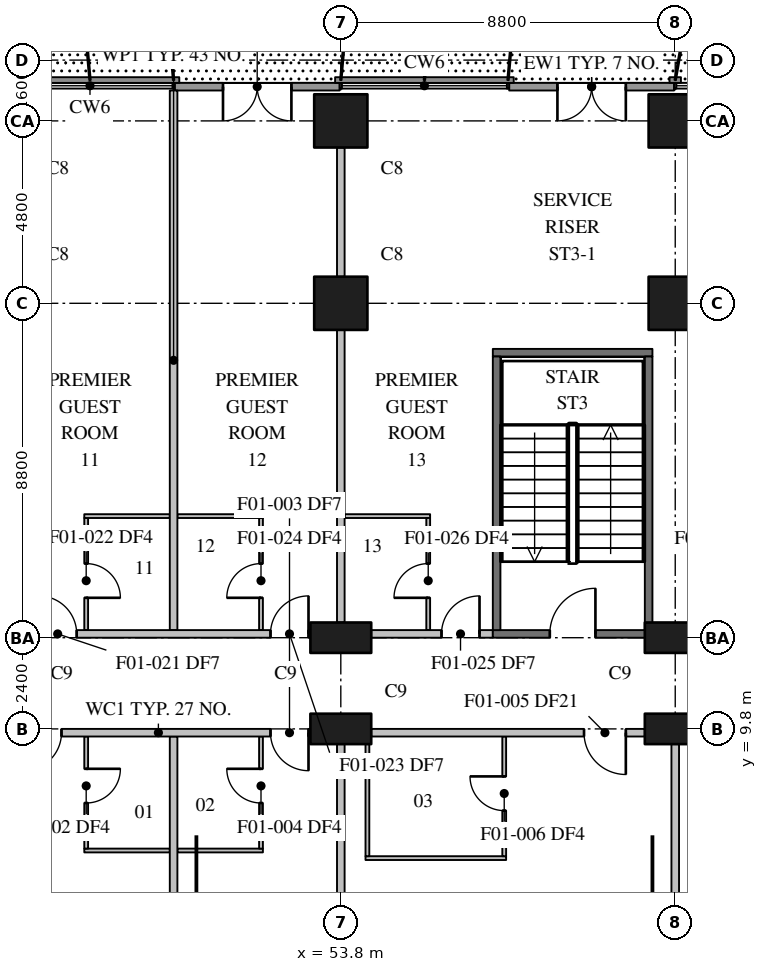
"""IFC4 building model, lengths in metres.
Left out: names, types, materials, properties, quantities, classifications, styles, units other than length and angle.
Written with IfcOpenShell. Run it as: python <this file> out.ifc"""

import sys

from ifc_helpers import new_model, si_unit, direction, frame, frame_2d, origin, origin_2d, place, context, subcontext, project, spatial, rectangle, extrude, element, fill, save


model = new_model("IFC4")
c1 = context("Model", 3, precision=1e-05, world=origin(), true_north=direction((0.0, 1.0)))
c2 = subcontext(c1, "Body", "Model", "MODEL_VIEW")
j1 = project(units=[si_unit("LENGTHUNIT", "METRE"), si_unit("PLANEANGLEUNIT", "RADIAN")], contexts=[c1])
p1 = place(None, origin())
s1 = spatial("IfcSite", under=j1, at=p1, CompositionType="ELEMENT")
p2 = place(p1, origin())
s2 = spatial("IfcBuilding", under=s1, at=p2, CompositionType="ELEMENT")
p3 = place(p2, frame((0.0, 0.0, 34.0)))
s3 = spatial("IfcBuildingStorey", under=s2, at=p3, CompositionType="ELEMENT", Elevation=34.0)
for number, where, z_axis, x_axis in (
    (1, (53.8, 9.8, 0.0), (0.0, 0.0, 1.0), (1.0, 0.0, 0.0)),
    (2, (53.8, 12.2, 0.0), (0.0, 0.0, 1.0), (1.0, 0.0, 0.0)),
):
    element("IfcColumn", number, at=place(p3, frame(where, z_axis=z_axis, x_axis=x_axis)), inside=s3, PredefinedType="COLUMN", context=c2, shape_type="SweptSolid", body=[
        extrude(rectangle(XDim=1.6, YDim=0.8, at=origin_2d()), origin(), (0.0, 0.0, 1.0), 3.7),
    ])
for number, where, z_axis, x_axis in (
    (3, (53.8, 21.0, 0.0), (0.0, 0.0, 1.0), (1.0, 0.0, 0.0)),
    (4, (53.8, 25.8, 0.0), (0.0, 0.0, 1.0), (1.0, 0.0, 0.0)),
):
    element("IfcColumn", number, at=place(p3, frame(where, z_axis=z_axis, x_axis=x_axis)), inside=s3, PredefinedType="COLUMN", context=c2, shape_type="SweptSolid", body=[
        extrude(rectangle(XDim=1.4, YDim=1.4, at=origin_2d()), origin(), (0.0, 0.0, 1.0), 3.7),
    ])
for number, where, z_axis, x_axis in (
    (5, (62.6, 9.8, 0.0), (0.0, 0.0, 1.0), (1.0, 0.0, 0.0)),
    (6, (62.6, 12.2, 0.0), (0.0, 0.0, 1.0), (1.0, 0.0, 0.0)),
):
    element("IfcColumn", number, at=place(p3, frame(where, z_axis=z_axis, x_axis=x_axis)), inside=s3, PredefinedType="COLUMN", context=c2, shape_type="SweptSolid", body=[
        extrude(rectangle(XDim=1.6, YDim=0.8, at=origin_2d()), origin(), (0.0, 0.0, 1.0), 3.7),
    ])
for number, where, z_axis, x_axis in (
    (7, (62.6, 21.0, 0.0), (0.0, 0.0, 1.0), (1.0, 0.0, 0.0)),
    (8, (62.6, 25.8, 0.0), (0.0, 0.0, 1.0), (1.0, 0.0, 0.0)),
):
    element("IfcColumn", number, at=place(p3, frame(where, z_axis=z_axis, x_axis=x_axis)), inside=s3, PredefinedType="COLUMN", context=c2, shape_type="SweptSolid", body=[
        extrude(rectangle(XDim=1.4, YDim=1.4, at=origin_2d()), origin(), (0.0, 0.0, 1.0), 3.7),
    ])
p4 = place(p3, frame((62.57, 26.7, 0.0), z_axis=(0.0, 0.0, 1.0), x_axis=(-1.0, 0.0, 0.0)))
e9 = element("IfcWall", 9, at=p4, inside=s3, PredefinedType="STANDARD", context=c2, shape_type="SweptSolid", body=[
    extrude(rectangle(XDim=4.34, YDim=0.2, at=frame_2d((2.17, 0.0))), origin(), (0.0, 0.0, 1.0), 3.4),
])
p5 = place(p4, frame((1.27, 0.0, 0.0)))
e10 = element("IfcOpeningElement", 10, at=p5, cuts=e9, PredefinedType="OPENING", context=c2, shape_type="SweptSolid", body=[
    extrude(rectangle(XDim=1.8, YDim=2.4, at=frame_2d((0.9, 1.2))), frame((0.0, 0.11, 0.0), z_axis=(0.0, -1.0, 0.0), x_axis=(1.0, 0.0, 0.0)), (0.0, 0.0, 1.0), 0.22),
])
p6 = place(p3, frame((53.77, 26.7, 0.0), z_axis=(0.0, 0.0, 1.0), x_axis=(-1.0, 0.0, 0.0)))
e11 = element("IfcWall", 11, at=p6, inside=s3, PredefinedType="STANDARD", context=c2, shape_type="SweptSolid", body=[
    extrude(rectangle(XDim=4.34, YDim=0.2, at=frame_2d((2.17, 0.0))), origin(), (0.0, 0.0, 1.0), 3.4),
])
p7 = place(p6, frame((1.27, 0.0, 0.0)))
e12 = element("IfcOpeningElement", 12, at=p7, cuts=e11, PredefinedType="OPENING", context=c2, shape_type="SweptSolid", body=[
    extrude(rectangle(XDim=1.8, YDim=2.4, at=frame_2d((0.9, 1.2))), frame((0.0, 0.11, 0.0), z_axis=(0.0, -1.0, 0.0), x_axis=(1.0, 0.0, 0.0)), (0.0, 0.0, 1.0), 0.22),
])
p8 = place(p3, frame((57.8, 12.3, 0.0), z_axis=(0.0, 0.0, 1.0), x_axis=(1.0, 0.0, 0.0)))
e13 = element("IfcWall", 13, at=p8, inside=s3, PredefinedType="SHEAR", context=c2, shape_type="SweptSolid", body=[
    extrude(rectangle(XDim=4.2, YDim=0.2, at=frame_2d((2.1, 0.0))), origin(), (0.0, 0.0, 1.0), 3.4),
])
p9 = place(p8, frame((1.5, 0.0, 0.0)))
e14 = element("IfcOpeningElement", 14, at=p9, cuts=e13, PredefinedType="OPENING", context=c2, shape_type="SweptSolid", body=[
    extrude(rectangle(XDim=1.2, YDim=2.1, at=frame_2d((0.6, 1.05))), frame((0.0, 0.11, 0.0), z_axis=(0.0, -1.0, 0.0), x_axis=(1.0, 0.0, 0.0)), (0.0, 0.0, 1.0), 0.22),
])
p10 = place(p3, frame((57.8, 19.7, 0.0), z_axis=(0.0, 0.0, 1.0), x_axis=(1.0, 0.0, 0.0)))
e15 = element("IfcWall", 15, at=p10, inside=s3, PredefinedType="SHEAR", context=c2, shape_type="SweptSolid", body=[
    extrude(rectangle(XDim=4.2, YDim=0.2, at=frame_2d((2.1, 0.0))), origin(), (0.0, 0.0, 1.0), 3.4),
])
for number, where, z_axis, x_axis in (
    (16, (57.9, 12.4, 0.0), (0.0, 0.0, 1.0), (0.0, 1.0, 0.0)),
    (17, (61.9, 12.4, 0.0), (0.0, 0.0, 1.0), (0.0, 1.0, 0.0)),
):
    element("IfcWall", number, at=place(p3, frame(where, z_axis=z_axis, x_axis=x_axis)), inside=s3, PredefinedType="SHEAR", context=c2, shape_type="SweptSolid", body=[
        extrude(rectangle(XDim=7.2, YDim=0.2, at=frame_2d((3.6, 0.0))), origin(), (0.0, 0.0, 1.0), 3.4),
    ])
p11 = place(p3, frame((53.0, 9.7, 0.0), z_axis=(0.0, 0.0, 1.0), x_axis=(-1.0, 0.0, 0.0)))
e18 = element("IfcWall", 18, at=p11, inside=s3, PredefinedType="PARTITIONING", context=c2, shape_type="SweptSolid", body=[
    extrude(rectangle(XDim=8.0, YDim=0.2, at=frame_2d((4.0, 0.0))), origin(), (0.0, 0.0, 1.0), 3.4),
])
p12 = place(p11, frame((6.55, 0.0, 0.0)))
e19 = element("IfcOpeningElement", 19, at=p12, cuts=e18, PredefinedType="OPENING", context=c2, shape_type="SweptSolid", body=[
    extrude(rectangle(XDim=1.0, YDim=2.1, at=frame_2d((0.5, 1.05))), frame((0.0, 0.11, 0.0), z_axis=(0.0, -1.0, 0.0), x_axis=(1.0, 0.0, 0.0)), (0.0, 0.0, 1.0), 0.22),
])
p13 = place(p11, frame((0.05, 0.0, 0.0)))
e20 = element("IfcOpeningElement", 20, at=p13, cuts=e18, PredefinedType="OPENING", context=c2, shape_type="SweptSolid", body=[
    extrude(rectangle(XDim=1.0, YDim=2.1, at=frame_2d((0.5, 1.05))), frame((0.0, 0.11, 0.0), z_axis=(0.0, -1.0, 0.0), x_axis=(1.0, 0.0, 0.0)), (0.0, 0.0, 1.0), 0.22),
])
p14 = place(p3, frame((61.8, 9.7, 0.0), z_axis=(0.0, 0.0, 1.0), x_axis=(-1.0, 0.0, 0.0)))
e21 = element("IfcWall", 21, at=p14, inside=s3, PredefinedType="PARTITIONING", context=c2, shape_type="SweptSolid", body=[
    extrude(rectangle(XDim=7.2, YDim=0.2, at=frame_2d((3.6, 0.0))), origin(), (0.0, 0.0, 1.0), 3.4),
])
p15 = place(p14, frame((0.5, 0.0, 0.0)))
e22 = element("IfcOpeningElement", 22, at=p15, cuts=e21, PredefinedType="OPENING", context=c2, shape_type="SweptSolid", body=[
    extrude(rectangle(XDim=1.1, YDim=2.1, at=frame_2d((0.55, 1.05))), frame((0.0, 0.11, 0.0), z_axis=(0.0, -1.0, 0.0), x_axis=(1.0, 0.0, 0.0)), (0.0, 0.0, 1.0), 0.22),
])
p16 = place(p3, frame((49.4, 0.31, 0.0), z_axis=(0.0, 0.0, 1.0), x_axis=(0.0, 1.0, 0.0)))
e23 = element("IfcWall", 23, at=p16, inside=s3, PredefinedType="PARTITIONING", context=c2, shape_type="SweptSolid", body=[
    extrude(rectangle(XDim=9.29, YDim=0.2, at=frame_2d((4.645, 0.0))), origin(), (0.0, 0.0, 1.0), 3.4),
])
p17 = place(p3, frame((49.4, 12.4, 0.0), z_axis=(0.0, 0.0, 1.0), x_axis=(0.0, 1.0, 0.0)))
e24 = element("IfcWall", 24, at=p17, inside=s3, PredefinedType="PARTITIONING", context=c2, shape_type="SweptSolid", body=[
    extrude(rectangle(XDim=14.2, YDim=0.2, at=frame_2d((7.1, 0.0))), origin(), (0.0, 0.0, 1.0), 3.4),
])
for number, where, z_axis, x_axis in (
    (25, (53.8, 1.7, 0.0), (0.0, 0.0, 1.0), (0.0, 1.0, 0.0)),
    (26, (53.8, 12.6, 0.0), (0.0, 0.0, 1.0), (0.0, 1.0, 0.0)),
):
    element("IfcWall", number, at=place(p3, frame(where, z_axis=z_axis, x_axis=x_axis)), inside=s3, PredefinedType="PARTITIONING", context=c2, shape_type="SweptSolid", body=[
        extrude(rectangle(XDim=7.7, YDim=0.2, at=frame_2d((3.85, 0.0))), origin(), (0.0, 0.0, 1.0), 3.4),
    ])
p18 = place(p3, frame((53.8, 21.7, 0.0), z_axis=(0.0, 0.0, 1.0), x_axis=(0.0, 1.0, 0.0)))
e27 = element("IfcWall", 27, at=p18, inside=s3, PredefinedType="PARTITIONING", context=c2, shape_type="SweptSolid", body=[
    extrude(rectangle(XDim=3.4, YDim=0.2, at=frame_2d((1.7, 0.0))), origin(), (0.0, 0.0, 1.0), 3.4),
])
p19 = place(p3, frame((62.6, 1.7, 0.0), z_axis=(0.0, 0.0, 1.0), x_axis=(0.0, 1.0, 0.0)))
e28 = element("IfcWall", 28, at=p19, inside=s3, PredefinedType="PARTITIONING", context=c2, shape_type="SweptSolid", body=[
    extrude(rectangle(XDim=7.7, YDim=0.2, at=frame_2d((3.85, 0.0))), origin(), (0.0, 0.0, 1.0), 3.4),
])
p20 = place(p3, frame((45.8, 12.3, 0.0), z_axis=(0.0, 0.0, 1.0), x_axis=(1.0, 0.0, 0.0)))
e29 = element("IfcWall", 29, at=p20, inside=s3, PredefinedType="PARTITIONING", context=c2, shape_type="SweptSolid", body=[
    extrude(rectangle(XDim=7.2, YDim=0.2, at=frame_2d((3.6, 0.0))), origin(), (0.0, 0.0, 1.0), 3.4),
])
p21 = place(p20, frame((0.05, 0.0, 0.0)))
e30 = element("IfcOpeningElement", 30, at=p21, cuts=e29, PredefinedType="OPENING", context=c2, shape_type="SweptSolid", body=[
    extrude(rectangle(XDim=1.0, YDim=2.1, at=frame_2d((0.5, 1.05))), frame((0.0, 0.11, 0.0), z_axis=(0.0, -1.0, 0.0), x_axis=(1.0, 0.0, 0.0)), (0.0, 0.0, 1.0), 0.22),
])
p22 = place(p20, frame((6.15, 0.0, 0.0)))
e31 = element("IfcOpeningElement", 31, at=p22, cuts=e29, PredefinedType="OPENING", context=c2, shape_type="SweptSolid", body=[
    extrude(rectangle(XDim=1.0, YDim=2.1, at=frame_2d((0.5, 1.05))), frame((0.0, 0.11, 0.0), z_axis=(0.0, -1.0, 0.0), x_axis=(1.0, 0.0, 0.0)), (0.0, 0.0, 1.0), 0.22),
])
p23 = place(p3, frame((54.6, 12.3, 0.0), z_axis=(0.0, 0.0, 1.0), x_axis=(1.0, 0.0, 0.0)))
e32 = element("IfcWall", 32, at=p23, inside=s3, PredefinedType="PARTITIONING", context=c2, shape_type="SweptSolid", body=[
    extrude(rectangle(XDim=3.2, YDim=0.2, at=frame_2d((1.6, 0.0))), origin(), (0.0, 0.0, 1.0), 3.4),
])
p24 = place(p23, frame((1.85, 0.0, 0.0)))
e33 = element("IfcOpeningElement", 33, at=p24, cuts=e32, PredefinedType="OPENING", context=c2, shape_type="SweptSolid", body=[
    extrude(rectangle(XDim=1.0, YDim=2.1, at=frame_2d((0.5, 1.05))), frame((0.0, 0.11, 0.0), z_axis=(0.0, -1.0, 0.0), x_axis=(1.0, 0.0, 0.0)), (0.0, 0.0, 1.0), 0.22),
])
for number, where, z_axis, x_axis in (
    (34, (47.05, 6.6, 0.0), (0.0, 0.0, 1.0), (1.0, 0.0, 0.0)),
    (35, (49.5, 6.6, 0.0), (0.0, 0.0, 1.0), (1.0, 0.0, 0.0)),
):
    element("IfcWall", number, at=place(p3, frame(where, z_axis=z_axis, x_axis=x_axis)), inside=s3, PredefinedType="PARTITIONING", context=c2, shape_type="SweptSolid", body=[
        extrude(rectangle(XDim=2.25, YDim=0.1, at=frame_2d((1.125, 0.0))), origin(), (0.0, 0.0, 1.0), 3.4),
    ])
p25 = place(p3, frame((47.1, 9.6, 0.0), z_axis=(0.0, 0.0, 1.0), x_axis=(0.0, -1.0, 0.0)))
e36 = element("IfcWall", 36, at=p25, inside=s3, PredefinedType="PARTITIONING", context=c2, shape_type="SweptSolid", body=[
    extrude(rectangle(XDim=2.95, YDim=0.1, at=frame_2d((1.475, 0.0))), origin(), (0.0, 0.0, 1.0), 3.4),
])
p26 = place(p25, frame((0.85, 0.0, 0.0)))
e37 = element("IfcOpeningElement", 37, at=p26, cuts=e36, PredefinedType="OPENING", context=c2, shape_type="SweptSolid", body=[
    extrude(rectangle(XDim=0.9, YDim=2.1, at=frame_2d((0.45, 1.05))), frame((0.0, 0.06, 0.0), z_axis=(0.0, -1.0, 0.0), x_axis=(1.0, 0.0, 0.0)), (0.0, 0.0, 1.0), 0.12),
])
p27 = place(p3, frame((47.1, 15.35, 0.0), z_axis=(0.0, 0.0, 1.0), x_axis=(0.0, -1.0, 0.0)))
e38 = element("IfcWall", 38, at=p27, inside=s3, PredefinedType="PARTITIONING", context=c2, shape_type="SweptSolid", body=[
    extrude(rectangle(XDim=2.95, YDim=0.1, at=frame_2d((1.475, 0.0))), origin(), (0.0, 0.0, 1.0), 3.4),
])
p28 = place(p27, frame((1.2, 0.0, 0.0)))
e39 = element("IfcOpeningElement", 39, at=p28, cuts=e38, PredefinedType="OPENING", context=c2, shape_type="SweptSolid", body=[
    extrude(rectangle(XDim=0.9, YDim=2.1, at=frame_2d((0.45, 1.05))), frame((0.0, 0.06, 0.0), z_axis=(0.0, -1.0, 0.0), x_axis=(1.0, 0.0, 0.0)), (0.0, 0.0, 1.0), 0.12),
])
p29 = place(p3, frame((51.7, 6.65, 0.0), z_axis=(0.0, 0.0, 1.0), x_axis=(0.0, 1.0, 0.0)))
e40 = element("IfcWall", 40, at=p29, inside=s3, PredefinedType="PARTITIONING", context=c2, shape_type="SweptSolid", body=[
    extrude(rectangle(XDim=2.95, YDim=0.1, at=frame_2d((1.475, 0.0))), origin(), (0.0, 0.0, 1.0), 3.4),
])
p30 = place(p29, frame((1.2, 0.0, 0.0)))
e41 = element("IfcOpeningElement", 41, at=p30, cuts=e40, PredefinedType="OPENING", context=c2, shape_type="SweptSolid", body=[
    extrude(rectangle(XDim=0.9, YDim=2.1, at=frame_2d((0.45, 1.05))), frame((0.0, 0.06, 0.0), z_axis=(0.0, -1.0, 0.0), x_axis=(1.0, 0.0, 0.0)), (0.0, 0.0, 1.0), 0.12),
])
p31 = place(p3, frame((51.7, 12.4, 0.0), z_axis=(0.0, 0.0, 1.0), x_axis=(0.0, 1.0, 0.0)))
e42 = element("IfcWall", 42, at=p31, inside=s3, PredefinedType="PARTITIONING", context=c2, shape_type="SweptSolid", body=[
    extrude(rectangle(XDim=2.95, YDim=0.1, at=frame_2d((1.475, 0.0))), origin(), (0.0, 0.0, 1.0), 3.4),
])
p32 = place(p31, frame((0.85, 0.0, 0.0)))
e43 = element("IfcOpeningElement", 43, at=p32, cuts=e42, PredefinedType="OPENING", context=c2, shape_type="SweptSolid", body=[
    extrude(rectangle(XDim=0.9, YDim=2.1, at=frame_2d((0.45, 1.05))), frame((0.0, 0.06, 0.0), z_axis=(0.0, -1.0, 0.0), x_axis=(1.0, 0.0, 0.0)), (0.0, 0.0, 1.0), 0.12),
])
p33 = place(p3, frame((54.45, 6.4, 0.0), z_axis=(0.0, 0.0, 1.0), x_axis=(1.0, 0.0, 0.0)))
e44 = element("IfcWall", 44, at=p33, inside=s3, PredefinedType="PARTITIONING", context=c2, shape_type="SweptSolid", body=[
    extrude(rectangle(XDim=3.7, YDim=0.1, at=frame_2d((1.85, 0.0))), origin(), (0.0, 0.0, 1.0), 3.4),
])
p34 = place(p3, frame((54.5, 6.45, 0.0), z_axis=(0.0, 0.0, 1.0), x_axis=(0.0, 1.0, 0.0)))
e45 = element("IfcWall", 45, at=p34, inside=s3, PredefinedType="PARTITIONING", context=c2, shape_type="SweptSolid", body=[
    extrude(rectangle(XDim=2.95, YDim=0.1, at=frame_2d((1.475, 0.0))), origin(), (0.0, 0.0, 1.0), 3.4),
])
p35 = place(p3, frame((58.1, 6.45, 0.0), z_axis=(0.0, 0.0, 1.0), x_axis=(0.0, 1.0, 0.0)))
e46 = element("IfcWall", 46, at=p35, inside=s3, PredefinedType="PARTITIONING", context=c2, shape_type="SweptSolid", body=[
    extrude(rectangle(XDim=3.15, YDim=0.1, at=frame_2d((1.575, 0.0))), origin(), (0.0, 0.0, 1.0), 3.4),
])
p36 = place(p35, frame((1.2, 0.0, 0.0)))
e47 = element("IfcOpeningElement", 47, at=p36, cuts=e46, PredefinedType="OPENING", context=c2, shape_type="SweptSolid", body=[
    extrude(rectangle(XDim=0.9, YDim=2.1, at=frame_2d((0.45, 1.05))), frame((0.0, 0.06, 0.0), z_axis=(0.0, -1.0, 0.0), x_axis=(1.0, 0.0, 0.0)), (0.0, 0.0, 1.0), 0.12),
])
for number, where, z_axis, x_axis in (
    (48, (47.05, 15.4, 0.0), (0.0, 0.0, 1.0), (1.0, 0.0, 0.0)),
    (49, (49.5, 15.4, 0.0), (0.0, 0.0, 1.0), (1.0, 0.0, 0.0)),
    (50, (53.9, 15.4, 0.0), (0.0, 0.0, 1.0), (1.0, 0.0, 0.0)),
):
    element("IfcWall", number, at=place(p3, frame(where, z_axis=z_axis, x_axis=x_axis)), inside=s3, PredefinedType="PARTITIONING", context=c2, shape_type="SweptSolid", body=[
        extrude(rectangle(XDim=2.25, YDim=0.1, at=frame_2d((1.125, 0.0))), origin(), (0.0, 0.0, 1.0), 3.4),
    ])
p37 = place(p3, frame((56.1, 12.4, 0.0), z_axis=(0.0, 0.0, 1.0), x_axis=(0.0, 1.0, 0.0)))
e51 = element("IfcWall", 51, at=p37, inside=s3, PredefinedType="PARTITIONING", context=c2, shape_type="SweptSolid", body=[
    extrude(rectangle(XDim=2.95, YDim=0.1, at=frame_2d((1.475, 0.0))), origin(), (0.0, 0.0, 1.0), 3.4),
])
p38 = place(p37, frame((0.85, 0.0, 0.0)))
e52 = element("IfcOpeningElement", 52, at=p38, cuts=e51, PredefinedType="OPENING", context=c2, shape_type="SweptSolid", body=[
    extrude(rectangle(XDim=0.9, YDim=2.1, at=frame_2d((0.45, 1.05))), frame((0.0, 0.06, 0.0), z_axis=(0.0, -1.0, 0.0), x_axis=(1.0, 0.0, 0.0)), (0.0, 0.0, 1.0), 0.12),
])
p39 = place(p5, origin())
e53 = element("IfcDoor", 53, at=p39, inside=s3, OperationType="SINGLE_SWING_LEFT", PredefinedType="DOOR", context=c2, shape_type="SweptSolid", body=[
    extrude(rectangle(XDim=1.8, YDim=2.4, at=frame_2d((0.9, 1.2))), frame((0.0, 0.025, 0.0), z_axis=(0.0, -1.0, 0.0), x_axis=(1.0, 0.0, 0.0)), (0.0, 0.0, 1.0), 0.05),
])
fill(e10, e53)
p40 = place(p7, origin())
e54 = element("IfcDoor", 54, at=p40, inside=s3, OperationType="SINGLE_SWING_LEFT", PredefinedType="DOOR", context=c2, shape_type="SweptSolid", body=[
    extrude(rectangle(XDim=1.8, YDim=2.4, at=frame_2d((0.9, 1.2))), frame((0.0, 0.025, 0.0), z_axis=(0.0, -1.0, 0.0), x_axis=(1.0, 0.0, 0.0)), (0.0, 0.0, 1.0), 0.05),
])
fill(e12, e54)
p41 = place(p9, origin())
e55 = element("IfcDoor", 55, at=p41, inside=s3, OperationType="SINGLE_SWING_RIGHT", PredefinedType="DOOR", context=c2, shape_type="SweptSolid", body=[
    extrude(rectangle(XDim=1.2, YDim=2.1, at=frame_2d((0.6, 1.05))), frame((0.0, 0.025, 0.0), z_axis=(0.0, -1.0, 0.0), x_axis=(1.0, 0.0, 0.0)), (0.0, 0.0, 1.0), 0.05),
])
fill(e14, e55)
p42 = place(p12, origin())
e56 = element("IfcDoor", 56, at=p42, inside=s3, OperationType="SINGLE_SWING_RIGHT", PredefinedType="DOOR", context=c2, shape_type="SweptSolid", body=[
    extrude(rectangle(XDim=1.0, YDim=2.1, at=frame_2d((0.5, 1.05))), frame((0.0, 0.025, 0.0), z_axis=(0.0, -1.0, 0.0), x_axis=(1.0, 0.0, 0.0)), (0.0, 0.0, 1.0), 0.05),
])
fill(e19, e56)
p43 = place(p26, origin())
e57 = element("IfcDoor", 57, at=p43, inside=s3, OperationType="SINGLE_SWING_LEFT", PredefinedType="DOOR", context=c2, shape_type="SweptSolid", body=[
    extrude(rectangle(XDim=0.9, YDim=2.1, at=frame_2d((0.45, 1.05))), frame((0.0, 0.025, 0.0), z_axis=(0.0, -1.0, 0.0), x_axis=(1.0, 0.0, 0.0)), (0.0, 0.0, 1.0), 0.05),
])
fill(e37, e57)
p44 = place(p13, origin())
e58 = element("IfcDoor", 58, at=p44, inside=s3, OperationType="SINGLE_SWING_LEFT", PredefinedType="DOOR", context=c2, shape_type="SweptSolid", body=[
    extrude(rectangle(XDim=1.0, YDim=2.1, at=frame_2d((0.5, 1.05))), frame((0.0, 0.025, 0.0), z_axis=(0.0, -1.0, 0.0), x_axis=(1.0, 0.0, 0.0)), (0.0, 0.0, 1.0), 0.05),
])
fill(e20, e58)
p45 = place(p30, origin())
e59 = element("IfcDoor", 59, at=p45, inside=s3, OperationType="SINGLE_SWING_RIGHT", PredefinedType="DOOR", context=c2, shape_type="SweptSolid", body=[
    extrude(rectangle(XDim=0.9, YDim=2.1, at=frame_2d((0.45, 1.05))), frame((0.0, 0.025, 0.0), z_axis=(0.0, -1.0, 0.0), x_axis=(1.0, 0.0, 0.0)), (0.0, 0.0, 1.0), 0.05),
])
fill(e41, e59)
p46 = place(p15, origin())
e60 = element("IfcDoor", 60, at=p46, inside=s3, OperationType="SINGLE_SWING_LEFT", PredefinedType="DOOR", context=c2, shape_type="SweptSolid", body=[
    extrude(rectangle(XDim=1.1, YDim=2.1, at=frame_2d((0.55, 1.05))), frame((0.0, 0.025, 0.0), z_axis=(0.0, -1.0, 0.0), x_axis=(1.0, 0.0, 0.0)), (0.0, 0.0, 1.0), 0.05),
])
fill(e22, e60)
p47 = place(p36, origin())
e61 = element("IfcDoor", 61, at=p47, inside=s3, OperationType="SINGLE_SWING_RIGHT", PredefinedType="DOOR", context=c2, shape_type="SweptSolid", body=[
    extrude(rectangle(XDim=0.9, YDim=2.1, at=frame_2d((0.45, 1.05))), frame((0.0, 0.025, 0.0), z_axis=(0.0, -1.0, 0.0), x_axis=(1.0, 0.0, 0.0)), (0.0, 0.0, 1.0), 0.05),
])
fill(e47, e61)
p48 = place(p21, origin())
e62 = element("IfcDoor", 62, at=p48, inside=s3, OperationType="SINGLE_SWING_LEFT", PredefinedType="DOOR", context=c2, shape_type="SweptSolid", body=[
    extrude(rectangle(XDim=1.0, YDim=2.1, at=frame_2d((0.5, 1.05))), frame((0.0, 0.025, 0.0), z_axis=(0.0, -1.0, 0.0), x_axis=(1.0, 0.0, 0.0)), (0.0, 0.0, 1.0), 0.05),
])
fill(e30, e62)
p49 = place(p28, origin())
e63 = element("IfcDoor", 63, at=p49, inside=s3, OperationType="SINGLE_SWING_RIGHT", PredefinedType="DOOR", context=c2, shape_type="SweptSolid", body=[
    extrude(rectangle(XDim=0.9, YDim=2.1, at=frame_2d((0.45, 1.05))), frame((0.0, 0.025, 0.0), z_axis=(0.0, -1.0, 0.0), x_axis=(1.0, 0.0, 0.0)), (0.0, 0.0, 1.0), 0.05),
])
fill(e39, e63)
p50 = place(p22, origin())
e64 = element("IfcDoor", 64, at=p50, inside=s3, OperationType="SINGLE_SWING_RIGHT", PredefinedType="DOOR", context=c2, shape_type="SweptSolid", body=[
    extrude(rectangle(XDim=1.0, YDim=2.1, at=frame_2d((0.5, 1.05))), frame((0.0, 0.025, 0.0), z_axis=(0.0, -1.0, 0.0), x_axis=(1.0, 0.0, 0.0)), (0.0, 0.0, 1.0), 0.05),
])
fill(e31, e64)
p51 = place(p32, origin())
e65 = element("IfcDoor", 65, at=p51, inside=s3, OperationType="SINGLE_SWING_LEFT", PredefinedType="DOOR", context=c2, shape_type="SweptSolid", body=[
    extrude(rectangle(XDim=0.9, YDim=2.1, at=frame_2d((0.45, 1.05))), frame((0.0, 0.025, 0.0), z_axis=(0.0, -1.0, 0.0), x_axis=(1.0, 0.0, 0.0)), (0.0, 0.0, 1.0), 0.05),
])
fill(e43, e65)
p52 = place(p24, origin())
e66 = element("IfcDoor", 66, at=p52, inside=s3, OperationType="SINGLE_SWING_RIGHT", PredefinedType="DOOR", context=c2, shape_type="SweptSolid", body=[
    extrude(rectangle(XDim=1.0, YDim=2.1, at=frame_2d((0.5, 1.05))), frame((0.0, 0.025, 0.0), z_axis=(0.0, -1.0, 0.0), x_axis=(1.0, 0.0, 0.0)), (0.0, 0.0, 1.0), 0.05),
])
fill(e33, e66)
p53 = place(p38, origin())
e67 = element("IfcDoor", 67, at=p53, inside=s3, OperationType="SINGLE_SWING_LEFT", PredefinedType="DOOR", context=c2, shape_type="SweptSolid", body=[
    extrude(rectangle(XDim=0.9, YDim=2.1, at=frame_2d((0.45, 1.05))), frame((0.0, 0.025, 0.0), z_axis=(0.0, -1.0, 0.0), x_axis=(1.0, 0.0, 0.0)), (0.0, 0.0, 1.0), 0.05),
])
fill(e52, e67)
save(model, sys.argv[1])
